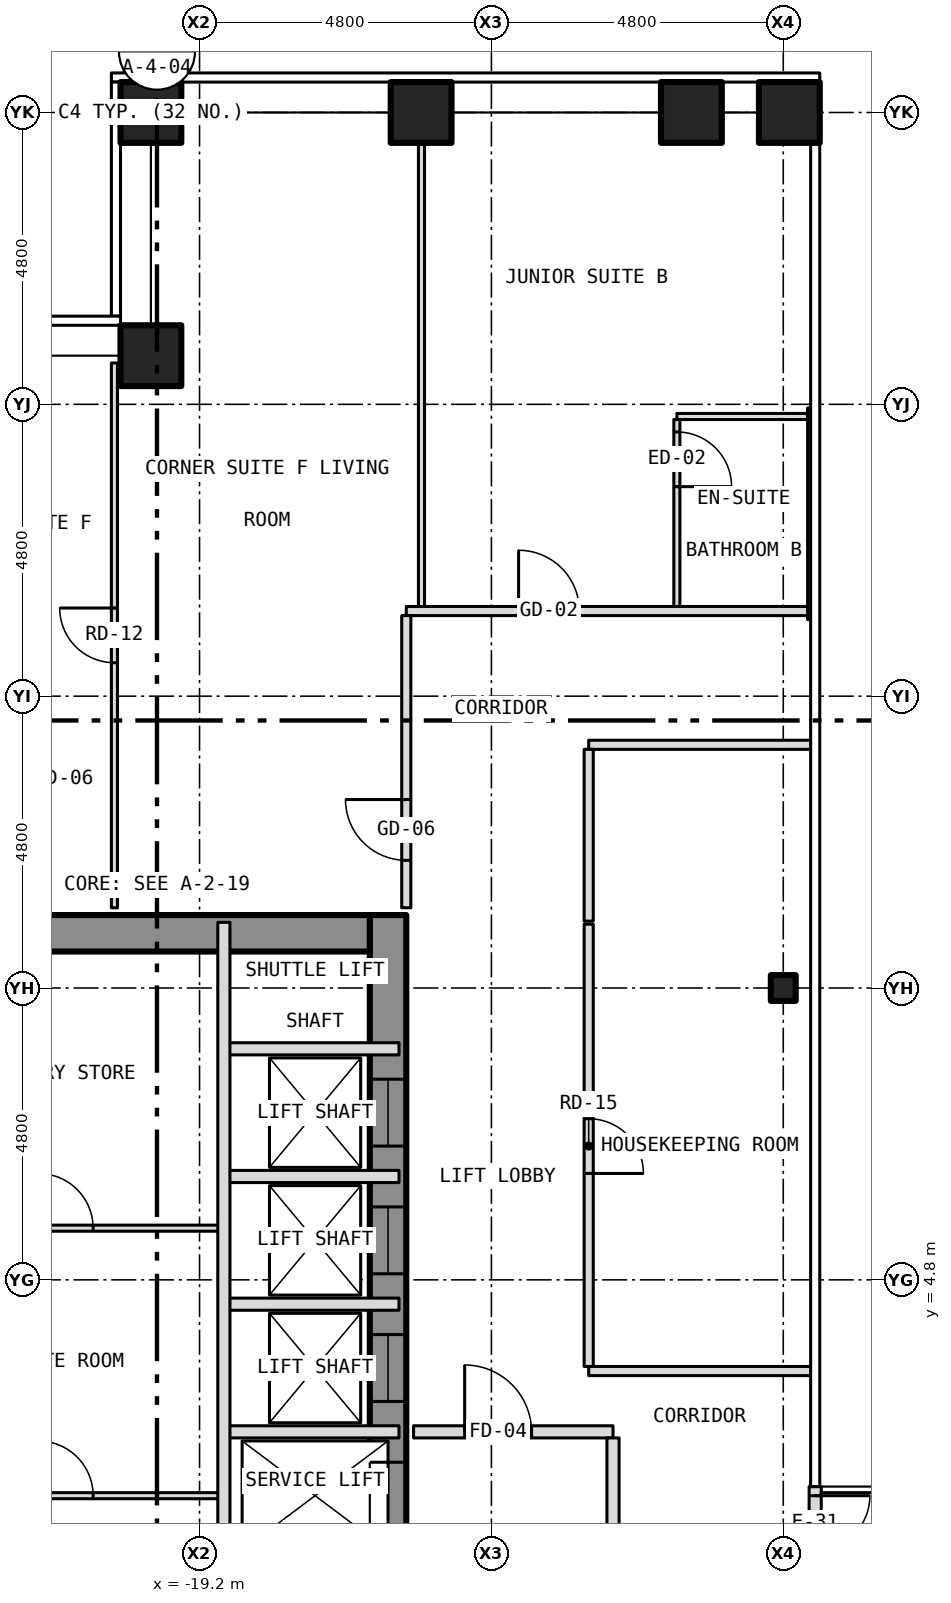
"""IFC4 building model, lengths in metres.
Left out: names, types, materials, properties, quantities, classifications, styles, units other than length and angle.
Written with IfcOpenShell. Run it as: python <this file> out.ifc"""

import sys

from ifc_helpers import new_model, si_unit, direction, frame, frame_2d, origin, origin_2d, place, context, subcontext, project, spatial, rectangle, hollow_rectangle, i_section, extrude, element, fill, save


model = new_model("IFC4")
c1 = context("Model", 3, precision=1e-05, world=origin(), true_north=direction((0.0, 1.0)))
c2 = subcontext(c1, "Body", "Model", "MODEL_VIEW")
j1 = project(units=[si_unit("LENGTHUNIT", "METRE"), si_unit("PLANEANGLEUNIT", "RADIAN")], contexts=[c1])
p1 = place(None, origin())
s1 = spatial("IfcSite", under=j1, at=p1, CompositionType="ELEMENT")
p2 = place(p1, origin())
s2 = spatial("IfcBuilding", under=s1, at=p2, CompositionType="ELEMENT")
p3 = place(p2, frame((0.0, 0.0, 70.5)))
s3 = spatial("IfcBuildingStorey", under=s2, at=p3, CompositionType="ELEMENT", Elevation=70.5)
for number, where, z_axis, x_axis in (
    (1, (-20.0, 24.0, -0.15), (0.0, 0.0, 1.0), (1.0, 0.0, 0.0)),
    (2, (-15.556, 24.0, -0.15), (0.0, 0.0, 1.0), (1.0, 0.0, 0.0)),
    (3, (-11.111, 24.0, -0.15), (0.0, 0.0, 1.0), (1.0, 0.0, 0.0)),
    (4, (-20.0, 20.0, -0.15), (0.0, 0.0, 1.0), (1.0, 0.0, 0.0)),
    (5, (-9.5, 24.0, -0.15), (0.0, 0.0, 1.0), (1.0, 0.0, 0.0)),
):
    element("IfcColumn", number, at=place(p3, frame(where, z_axis=z_axis, x_axis=x_axis)), inside=s3, PredefinedType="COLUMN", context=c2, shape_type="SweptSolid", body=[
        extrude(hollow_rectangle(XDim=1.0, YDim=1.0, WallThickness=0.06, at=origin_2d()), origin(), (0.0, 0.0, 1.0), 3.5),
    ])
p4 = place(p3, frame((-9.6, 9.6, -0.15), z_axis=(0.0, 0.0, 1.0), x_axis=(1.0, 0.0, 0.0)))
e6 = element("IfcColumn", 6, at=p4, inside=s3, PredefinedType="COLUMN", context=c2, shape_type="SweptSolid", body=[
    extrude(i_section(OverallWidth=0.409, OverallDepth=0.424, WebThickness=0.033, FlangeThickness=0.052, at=origin_2d()), origin(), (0.0, 0.0, 1.0), 3.5),
])
p5 = place(p3, frame((-16.1, -10.8, 0.0), z_axis=(0.0, 0.0, 1.0), x_axis=(0.0, 1.0, 0.0)))
e7 = element("IfcWall", 7, at=p5, inside=s3, PredefinedType="SHEAR", context=c2, shape_type="SweptSolid", body=[
    extrude(rectangle(XDim=21.6, YDim=0.6, at=frame_2d((10.8, 0.0))), origin(), (0.0, 0.0, 1.0), 3.25),
])
p6 = place(p5, frame((9.4, 0.0, 0.0)))
e8 = element("IfcOpeningElement", 8, at=p6, cuts=e7, PredefinedType="OPENING", context=c2, shape_type="SweptSolid", body=[
    extrude(rectangle(XDim=1.1, YDim=2.1, at=frame_2d((0.55, 1.05))), frame((0.0, 0.312, 0.0), z_axis=(0.0, -1.0, 0.0), x_axis=(1.0, 0.0, 0.0)), (0.0, 0.0, 1.0), 0.624),
])
p7 = place(p5, frame((11.5, 0.0, 0.0)))
e9 = element("IfcOpeningElement", 9, at=p7, cuts=e7, PredefinedType="OPENING", context=c2, shape_type="SweptSolid", body=[
    extrude(rectangle(XDim=1.1, YDim=2.1, at=frame_2d((0.55, 1.05))), frame((0.0, 0.312, 0.0), z_axis=(0.0, -1.0, 0.0), x_axis=(1.0, 0.0, 0.0)), (0.0, 0.0, 1.0), 0.624),
])
p8 = place(p5, frame((13.6, 0.0, 0.0)))
e10 = element("IfcOpeningElement", 10, at=p8, cuts=e7, PredefinedType="OPENING", context=c2, shape_type="SweptSolid", body=[
    extrude(rectangle(XDim=1.1, YDim=2.1, at=frame_2d((0.55, 1.05))), frame((0.0, 0.312, 0.0), z_axis=(0.0, -1.0, 0.0), x_axis=(1.0, 0.0, 0.0)), (0.0, 0.0, 1.0), 0.624),
])
p9 = place(p5, frame((15.7, 0.0, 0.0)))
e11 = element("IfcOpeningElement", 11, at=p9, cuts=e7, PredefinedType="OPENING", context=c2, shape_type="SweptSolid", body=[
    extrude(rectangle(XDim=1.1, YDim=2.1, at=frame_2d((0.55, 1.05))), frame((0.0, 0.312, 0.0), z_axis=(0.0, -1.0, 0.0), x_axis=(1.0, 0.0, 0.0)), (0.0, 0.0, 1.0), 0.624),
])
p10 = place(p5, frame((17.8, 0.0, 0.0)))
e12 = element("IfcOpeningElement", 12, at=p10, cuts=e7, PredefinedType="OPENING", context=c2, shape_type="SweptSolid", body=[
    extrude(rectangle(XDim=1.1, YDim=2.1, at=frame_2d((0.55, 1.05))), frame((0.0, 0.312, 0.0), z_axis=(0.0, -1.0, 0.0), x_axis=(1.0, 0.0, 0.0)), (0.0, 0.0, 1.0), 0.624),
])
p11 = place(p5, frame((0.758, 0.0, 0.0)))
e13 = element("IfcOpeningElement", 13, at=p11, cuts=e7, PredefinedType="OPENING", context=c2, shape_type="SweptSolid", body=[
    extrude(rectangle(XDim=1.1, YDim=2.1, at=frame_2d((0.55, 1.05))), frame((0.0, 0.312, 0.0), z_axis=(0.0, -1.0, 0.0), x_axis=(1.0, 0.0, 0.0)), (0.0, 0.0, 1.0), 0.624),
])
p12 = place(p5, frame((7.5, 0.0, 0.0)))
e14 = element("IfcOpeningElement", 14, at=p12, cuts=e7, PredefinedType="OPENING", context=c2, shape_type="SweptSolid", body=[
    extrude(rectangle(XDim=1.1, YDim=2.1, at=frame_2d((0.55, 1.05))), frame((0.0, 0.312, 0.0), z_axis=(0.0, -1.0, 0.0), x_axis=(1.0, 0.0, 0.0)), (0.0, 0.0, 1.0), 0.624),
])
p13 = place(p3, frame((-23.4, 10.5, 0.0), z_axis=(0.0, 0.0, 1.0), x_axis=(1.0, 0.0, 0.0)))
e15 = element("IfcWall", 15, at=p13, inside=s3, PredefinedType="SHEAR", context=c2, shape_type="SweptSolid", body=[
    extrude(rectangle(XDim=7.0, YDim=0.6, at=frame_2d((3.5, 0.0))), origin(), (0.0, 0.0, 1.0), 3.25),
])
p14 = place(p3, frame((-9.075, -1.4, 0.0), z_axis=(0.0, 0.0, 1.0), x_axis=(0.0, 1.0, 0.0)))
e16 = element("IfcWall", 16, at=p14, inside=s3, PredefinedType="SOLIDWALL", context=c2, shape_type="SweptSolid", body=[
    extrude(rectangle(XDim=2.8, YDim=0.2, at=frame_2d((1.4, 0.0))), origin(), (0.0, 0.0, 1.0), 3.5),
])
p15 = place(p14, frame((0.15, 0.0, 0.0)))
e17 = element("IfcOpeningElement", 17, at=p15, cuts=e16, PredefinedType="OPENING", context=c2, shape_type="SweptSolid", body=[
    extrude(rectangle(XDim=0.9, YDim=2.1, at=frame_2d((0.45, 1.05))), frame((0.0, 0.112, 0.0), z_axis=(0.0, -1.0, 0.0), x_axis=(1.0, 0.0, 0.0)), (0.0, 0.0, 1.0), 0.224),
])
p16 = place(p14, frame((1.75, 0.0, 0.0)))
e18 = element("IfcOpeningElement", 18, at=p16, cuts=e16, PredefinedType="OPENING", context=c2, shape_type="SweptSolid", body=[
    extrude(rectangle(XDim=0.9, YDim=2.1, at=frame_2d((0.45, 1.05))), frame((0.0, 0.112, 0.0), z_axis=(0.0, -1.0, 0.0), x_axis=(1.0, 0.0, 0.0)), (0.0, 0.0, 1.0), 0.224),
])
p17 = place(p3, frame((-23.88, 1.25, 0.0), z_axis=(0.0, 0.0, 1.0), x_axis=(1.0, 0.0, 0.0)))
e19 = element("IfcWall", 19, at=p17, inside=s3, PredefinedType="PARTITIONING", context=c2, shape_type="SweptSolid", body=[
    extrude(rectangle(XDim=5.08, YDim=0.1, at=frame_2d((2.54, 0.0))), origin(), (0.0, 0.0, 1.0), 3.25),
])
p18 = place(p17, frame((2.03, 0.0, 0.0)))
e20 = element("IfcOpeningElement", 20, at=p18, cuts=e19, PredefinedType="OPENING", context=c2, shape_type="SweptSolid", body=[
    extrude(rectangle(XDim=0.9, YDim=2.1, at=frame_2d((0.45, 1.05))), frame((0.0, 0.062, 0.0), z_axis=(0.0, -1.0, 0.0), x_axis=(1.0, 0.0, 0.0)), (0.0, 0.0, 1.0), 0.124),
])
p19 = place(p3, frame((-18.8, 2.3, 0.0), z_axis=(0.0, 0.0, 1.0), x_axis=(1.0, 0.0, 0.0)))
e21 = element("IfcWall", 21, at=p19, inside=s3, PredefinedType="PARTITIONING", context=c2, shape_type="SweptSolid", body=[
    extrude(rectangle(XDim=2.88, YDim=0.2, at=frame_2d((1.44, 0.0))), origin(), (0.0, 0.0, 1.0), 3.25),
])
p20 = place(p3, frame((-15.68, 2.3, 0.0), z_axis=(0.0, 0.0, 1.0), x_axis=(1.0, 0.0, 0.0)))
e22 = element("IfcWall", 22, at=p20, inside=s3, PredefinedType="PARTITIONING", context=c2, shape_type="SweptSolid", body=[
    extrude(rectangle(XDim=3.28, YDim=0.2, at=frame_2d((1.64, 0.0))), origin(), (0.0, 0.0, 1.0), 3.35),
])
p21 = place(p20, frame((0.84, 0.0, 0.0)))
e23 = element("IfcOpeningElement", 23, at=p21, cuts=e22, PredefinedType="OPENING", context=c2, shape_type="SweptSolid", body=[
    extrude(rectangle(XDim=1.1, YDim=2.1, at=frame_2d((0.55, 1.05))), frame((0.0, 0.112, 0.0), z_axis=(0.0, -1.0, 0.0), x_axis=(1.0, 0.0, 0.0)), (0.0, 0.0, 1.0), 0.224),
])
p22 = place(p3, frame((-12.8, 3.3, 0.0), z_axis=(0.0, 0.0, 1.0), x_axis=(1.0, 0.0, 0.0)))
e24 = element("IfcWall", 24, at=p22, inside=s3, PredefinedType="PARTITIONING", context=c2, shape_type="SweptSolid", body=[
    extrude(rectangle(XDim=3.68, YDim=0.15, at=frame_2d((1.84, 0.0))), origin(), (0.0, 0.0, 1.0), 3.35),
])
p23 = place(p3, frame((-18.8, 4.4, 0.0), z_axis=(0.0, 0.0, 1.0), x_axis=(1.0, 0.0, 0.0)))
e25 = element("IfcWall", 25, at=p23, inside=s3, PredefinedType="PARTITIONING", context=c2, shape_type="SweptSolid", body=[
    extrude(rectangle(XDim=2.88, YDim=0.2, at=frame_2d((1.44, 0.0))), origin(), (0.0, 0.0, 1.0), 3.25),
])
p24 = place(p3, frame((-23.88, 5.65, 0.0), z_axis=(0.0, 0.0, 1.0), x_axis=(1.0, 0.0, 0.0)))
e26 = element("IfcWall", 26, at=p24, inside=s3, PredefinedType="PARTITIONING", context=c2, shape_type="SweptSolid", body=[
    extrude(rectangle(XDim=5.08, YDim=0.1, at=frame_2d((2.54, 0.0))), origin(), (0.0, 0.0, 1.0), 3.25),
])
p25 = place(p24, frame((2.03, 0.0, 0.0)))
e27 = element("IfcOpeningElement", 27, at=p25, cuts=e26, PredefinedType="OPENING", context=c2, shape_type="SweptSolid", body=[
    extrude(rectangle(XDim=0.9, YDim=2.1, at=frame_2d((0.45, 1.05))), frame((0.0, 0.062, 0.0), z_axis=(0.0, -1.0, 0.0), x_axis=(1.0, 0.0, 0.0)), (0.0, 0.0, 1.0), 0.124),
])
for number, where, z_axis, x_axis in (
    (28, (-18.8, 6.5, 0.0), (0.0, 0.0, 1.0), (1.0, 0.0, 0.0)),
    (29, (-18.8, 8.6, 0.0), (0.0, 0.0, 1.0), (1.0, 0.0, 0.0)),
):
    element("IfcWall", number, at=place(p3, frame(where, z_axis=z_axis, x_axis=x_axis)), inside=s3, PredefinedType="PARTITIONING", context=c2, shape_type="SweptSolid", body=[
        extrude(rectangle(XDim=2.88, YDim=0.2, at=frame_2d((1.44, 0.0))), origin(), (0.0, 0.0, 1.0), 3.25),
    ])
p26 = place(p3, frame((-12.8, 13.6, 0.0), z_axis=(0.0, 0.0, 1.0), x_axis=(1.0, 0.0, 0.0)))
e30 = element("IfcWall", 30, at=p26, inside=s3, PredefinedType="PARTITIONING", context=c2, shape_type="SweptSolid", body=[
    extrude(rectangle(XDim=3.68, YDim=0.15, at=frame_2d((1.84, 0.0))), origin(), (0.0, 0.0, 1.0), 3.35),
])
p27 = place(p3, frame((-15.8, 15.8, 0.0), z_axis=(0.0, 0.0, 1.0), x_axis=(1.0, 0.0, 0.0)))
e31 = element("IfcWall", 31, at=p27, inside=s3, PredefinedType="PARTITIONING", context=c2, shape_type="SweptSolid", body=[
    extrude(rectangle(XDim=6.65, YDim=0.15, at=frame_2d((3.325, 0.0))), origin(), (0.0, 0.0, 1.0), 3.35),
])
p28 = place(p27, frame((1.847, 0.0, 0.0)))
e32 = element("IfcOpeningElement", 32, at=p28, cuts=e31, PredefinedType="OPENING", context=c2, shape_type="SweptSolid", body=[
    extrude(rectangle(XDim=1.0, YDim=2.1, at=frame_2d((0.5, 1.05))), frame((0.0, 0.087, 0.0), z_axis=(0.0, -1.0, 0.0), x_axis=(1.0, 0.0, 0.0)), (0.0, 0.0, 1.0), 0.174),
])
p29 = place(p3, frame((-11.35, 19.0, 0.0), z_axis=(0.0, 0.0, 1.0), x_axis=(1.0, 0.0, 0.0)))
e33 = element("IfcWall", 33, at=p29, inside=s3, PredefinedType="PARTITIONING", context=c2, shape_type="SweptSolid", body=[
    extrude(rectangle(XDim=2.2, YDim=0.1, at=frame_2d((1.1, 0.0))), origin(), (0.0, 0.0, 1.0), 3.35),
])
p30 = place(p3, frame((-20.6, 10.92, 0.0), z_axis=(0.0, 0.0, 1.0), x_axis=(0.0, 1.0, 0.0)))
e34 = element("IfcWall", 34, at=p30, inside=s3, PredefinedType="PARTITIONING", context=c2, shape_type="SweptSolid", body=[
    extrude(rectangle(XDim=8.96, YDim=0.1, at=frame_2d((4.48, 0.0))), origin(), (0.0, 0.0, 1.0), 3.35),
])
p31 = place(p30, frame((4.03, 0.0, 0.0)))
e35 = element("IfcOpeningElement", 35, at=p31, cuts=e34, PredefinedType="OPENING", context=c2, shape_type="SweptSolid", body=[
    extrude(rectangle(XDim=0.9, YDim=2.1, at=frame_2d((0.45, 1.05))), frame((0.0, 0.062, 0.0), z_axis=(0.0, -1.0, 0.0), x_axis=(1.0, 0.0, 0.0)), (0.0, 0.0, 1.0), 0.124),
])
p32 = place(p3, frame((-18.8, -1.8, 0.0), z_axis=(0.0, 0.0, 1.0), x_axis=(0.0, 1.0, 0.0)))
e36 = element("IfcWall", 36, at=p32, inside=s3, PredefinedType="PARTITIONING", context=c2, shape_type="SweptSolid", body=[
    extrude(rectangle(XDim=12.48, YDim=0.2, at=frame_2d((6.24, 0.0))), origin(), (0.0, 0.0, 1.0), 3.25),
])
p33 = place(p3, frame((-15.8, 10.92, 0.0), z_axis=(0.0, 0.0, 1.0), x_axis=(0.0, 1.0, 0.0)))
e37 = element("IfcWall", 37, at=p33, inside=s3, PredefinedType="PARTITIONING", context=c2, shape_type="SweptSolid", body=[
    extrude(rectangle(XDim=4.805, YDim=0.15, at=frame_2d((2.403, 0.0))), origin(), (0.0, 0.0, 1.0), 3.35),
])
p34 = place(p33, frame((0.78, 0.0, 0.0)))
e38 = element("IfcOpeningElement", 38, at=p34, cuts=e37, PredefinedType="OPENING", context=c2, shape_type="SweptSolid", body=[
    extrude(rectangle(XDim=1.0, YDim=2.1, at=frame_2d((0.5, 1.05))), frame((0.0, 0.087, 0.0), z_axis=(0.0, -1.0, 0.0), x_axis=(1.0, 0.0, 0.0)), (0.0, 0.0, 1.0), 0.174),
])
p35 = place(p3, frame((-15.55, 15.875, 0.0), z_axis=(0.0, 0.0, 1.0), x_axis=(0.0, 1.0, 0.0)))
e39 = element("IfcWall", 39, at=p35, inside=s3, PredefinedType="PARTITIONING", context=c2, shape_type="SweptSolid", body=[
    extrude(rectangle(XDim=8.005, YDim=0.1, at=frame_2d((4.002, 0.0))), origin(), (0.0, 0.0, 1.0), 3.35),
])
p36 = place(p3, frame((-12.8, 3.375, 0.0), z_axis=(0.0, 0.0, 1.0), x_axis=(0.0, 1.0, 0.0)))
e40 = element("IfcWall", 40, at=p36, inside=s3, PredefinedType="PARTITIONING", context=c2, shape_type="SweptSolid", body=[
    extrude(rectangle(XDim=7.275, YDim=0.15, at=frame_2d((3.637, 0.0))), origin(), (0.0, 0.0, 1.0), 3.35),
])
p37 = place(p36, frame((3.175, 0.0, 0.0)))
e41 = element("IfcOpeningElement", 41, at=p37, cuts=e40, PredefinedType="OPENING", context=c2, shape_type="SweptSolid", body=[
    extrude(rectangle(XDim=0.9, YDim=2.1, at=frame_2d((0.45, 1.05))), frame((0.0, 0.087, 0.0), z_axis=(0.0, -1.0, 0.0), x_axis=(1.0, 0.0, 0.0)), (0.0, 0.0, 1.0), 0.174),
])
p38 = place(p3, frame((-12.8, 10.7, 0.0), z_axis=(0.0, 0.0, 1.0), x_axis=(0.0, 1.0, 0.0)))
e42 = element("IfcWall", 42, at=p38, inside=s3, PredefinedType="PARTITIONING", context=c2, shape_type="SweptSolid", body=[
    extrude(rectangle(XDim=2.825, YDim=0.15, at=frame_2d((1.413, 0.0))), origin(), (0.0, 0.0, 1.0), 3.35),
])
p39 = place(p3, frame((-12.4, -1.8, 0.0), z_axis=(0.0, 0.0, 1.0), x_axis=(0.0, 1.0, 0.0)))
e43 = element("IfcWall", 43, at=p39, inside=s3, PredefinedType="PARTITIONING", context=c2, shape_type="SweptSolid", body=[
    extrude(rectangle(XDim=4.0, YDim=0.2, at=frame_2d((2.0, 0.0))), origin(), (0.0, 0.0, 1.0), 3.35),
])
p40 = place(p39, frame((1.25, 0.0, 0.0)))
e44 = element("IfcOpeningElement", 44, at=p40, cuts=e43, PredefinedType="OPENING", context=c2, shape_type="SweptSolid", body=[
    extrude(rectangle(XDim=1.1, YDim=2.1, at=frame_2d((0.55, 1.05))), frame((0.0, 0.112, 0.0), z_axis=(0.0, -1.0, 0.0), x_axis=(1.0, 0.0, 0.0)), (0.0, 0.0, 1.0), 0.224),
])
p41 = place(p3, frame((-11.35, 15.875, 0.0), z_axis=(0.0, 0.0, 1.0), x_axis=(0.0, 1.0, 0.0)))
e45 = element("IfcWall", 45, at=p41, inside=s3, PredefinedType="PARTITIONING", context=c2, shape_type="SweptSolid", body=[
    extrude(rectangle(XDim=3.075, YDim=0.1, at=frame_2d((1.538, 0.0))), origin(), (0.0, 0.0, 1.0), 3.35),
])
p42 = place(p41, frame((1.971, 0.0, 0.0)))
e46 = element("IfcOpeningElement", 46, at=p42, cuts=e45, PredefinedType="OPENING", context=c2, shape_type="SweptSolid", body=[
    extrude(rectangle(XDim=0.9, YDim=2.1, at=frame_2d((0.45, 1.05))), frame((0.0, 0.062, 0.0), z_axis=(0.0, -1.0, 0.0), x_axis=(1.0, 0.0, 0.0)), (0.0, 0.0, 1.0), 0.124),
])
p43 = place(p3, frame((-9.15, 15.66, 0.0), z_axis=(0.0, 0.0, 1.0), x_axis=(0.0, 1.0, 0.0)))
e47 = element("IfcWall", 47, at=p43, inside=s3, PredefinedType="PARTITIONING", context=c2, shape_type="SweptSolid", body=[
    extrude(rectangle(XDim=3.48, YDim=0.1, at=frame_2d((1.74, 0.0))), origin(), (0.0, 0.0, 1.0), 2.733),
])
p44 = place(p16, origin())
e48 = element("IfcDoor", 48, at=p44, inside=s3, OperationType="SINGLE_SWING_RIGHT", PredefinedType="DOOR", context=c2, shape_type="SweptSolid", body=[
    extrude(rectangle(XDim=0.9, YDim=2.1, at=frame_2d((0.45, 1.05))), frame((0.0, 0.025, 0.0), z_axis=(0.0, -1.0, 0.0), x_axis=(1.0, 0.0, 0.0)), (0.0, 0.0, 1.0), 0.05),
])
fill(e18, e48)
p45 = place(p7, origin())
e49 = element("IfcDoor", 49, at=p45, inside=s3, OperationType="SLIDING_TO_LEFT", PredefinedType="DOOR", context=c2, shape_type="SweptSolid", body=[
    extrude(rectangle(XDim=1.1, YDim=2.1, at=frame_2d((0.55, 1.05))), frame((0.0, 0.025, 0.0), z_axis=(0.0, -1.0, 0.0), x_axis=(1.0, 0.0, 0.0)), (0.0, 0.0, 1.0), 0.05),
])
fill(e9, e49)
p46 = place(p8, origin())
e50 = element("IfcDoor", 50, at=p46, inside=s3, OperationType="SLIDING_TO_LEFT", PredefinedType="DOOR", context=c2, shape_type="SweptSolid", body=[
    extrude(rectangle(XDim=1.1, YDim=2.1, at=frame_2d((0.55, 1.05))), frame((0.0, 0.025, 0.0), z_axis=(0.0, -1.0, 0.0), x_axis=(1.0, 0.0, 0.0)), (0.0, 0.0, 1.0), 0.05),
])
fill(e10, e50)
p47 = place(p9, origin())
e51 = element("IfcDoor", 51, at=p47, inside=s3, OperationType="SLIDING_TO_LEFT", PredefinedType="DOOR", context=c2, shape_type="SweptSolid", body=[
    extrude(rectangle(XDim=1.1, YDim=2.1, at=frame_2d((0.55, 1.05))), frame((0.0, 0.025, 0.0), z_axis=(0.0, -1.0, 0.0), x_axis=(1.0, 0.0, 0.0)), (0.0, 0.0, 1.0), 0.05),
])
fill(e11, e51)
p48 = place(p10, origin())
e52 = element("IfcDoor", 52, at=p48, inside=s3, OperationType="SLIDING_TO_LEFT", PredefinedType="DOOR", context=c2, shape_type="SweptSolid", body=[
    extrude(rectangle(XDim=1.1, YDim=2.1, at=frame_2d((0.55, 1.05))), frame((0.0, 0.025, 0.0), z_axis=(0.0, -1.0, 0.0), x_axis=(1.0, 0.0, 0.0)), (0.0, 0.0, 1.0), 0.05),
])
fill(e12, e52)
p49 = place(p18, origin())
e53 = element("IfcDoor", 53, at=p49, inside=s3, OperationType="SINGLE_SWING_LEFT", PredefinedType="DOOR", context=c2, shape_type="SweptSolid", body=[
    extrude(rectangle(XDim=0.9, YDim=2.1, at=frame_2d((0.45, 1.05))), frame((0.0, 0.025, 0.0), z_axis=(0.0, -1.0, 0.0), x_axis=(1.0, 0.0, 0.0)), (0.0, 0.0, 1.0), 0.05),
])
fill(e20, e53)
p50 = place(p25, origin())
e54 = element("IfcDoor", 54, at=p50, inside=s3, OperationType="SINGLE_SWING_LEFT", PredefinedType="DOOR", context=c2, shape_type="SweptSolid", body=[
    extrude(rectangle(XDim=0.9, YDim=2.1, at=frame_2d((0.45, 1.05))), frame((0.0, 0.025, 0.0), z_axis=(0.0, -1.0, 0.0), x_axis=(1.0, 0.0, 0.0)), (0.0, 0.0, 1.0), 0.05),
])
fill(e27, e54)
p51 = place(p21, origin())
e55 = element("IfcDoor", 55, at=p51, inside=s3, OperationType="SINGLE_SWING_LEFT", PredefinedType="DOOR", context=c2, shape_type="SweptSolid", body=[
    extrude(rectangle(XDim=1.1, YDim=2.1, at=frame_2d((0.55, 1.05))), frame((0.0, 0.025, 0.0), z_axis=(0.0, -1.0, 0.0), x_axis=(1.0, 0.0, 0.0)), (0.0, 0.0, 1.0), 0.05),
])
fill(e23, e55)
p52 = place(p28, origin())
e56 = element("IfcDoor", 56, at=p52, inside=s3, OperationType="SINGLE_SWING_LEFT", PredefinedType="DOOR", context=c2, shape_type="SweptSolid", body=[
    extrude(rectangle(XDim=1.0, YDim=2.1, at=frame_2d((0.5, 1.05))), frame((0.0, 0.025, 0.0), z_axis=(0.0, -1.0, 0.0), x_axis=(1.0, 0.0, 0.0)), (0.0, 0.0, 1.0), 0.05),
])
fill(e32, e56)
p53 = place(p42, origin())
e57 = element("IfcDoor", 57, at=p53, inside=s3, OperationType="SINGLE_SWING_LEFT", PredefinedType="DOOR", context=c2, shape_type="SweptSolid", body=[
    extrude(rectangle(XDim=0.9, YDim=2.1, at=frame_2d((0.45, 1.05))), frame((0.0, 0.025, 0.0), z_axis=(0.0, -1.0, 0.0), x_axis=(1.0, 0.0, 0.0)), (0.0, 0.0, 1.0), 0.05),
])
fill(e46, e57)
p54 = place(p34, origin())
e58 = element("IfcDoor", 58, at=p54, inside=s3, OperationType="SINGLE_SWING_RIGHT", PredefinedType="DOOR", context=c2, shape_type="SweptSolid", body=[
    extrude(rectangle(XDim=1.0, YDim=2.1, at=frame_2d((0.5, 1.05))), frame((0.0, 0.025, 0.0), z_axis=(0.0, -1.0, 0.0), x_axis=(1.0, 0.0, 0.0)), (0.0, 0.0, 1.0), 0.05),
])
fill(e38, e58)
p55 = place(p31, origin())
e59 = element("IfcDoor", 59, at=p55, inside=s3, OperationType="SINGLE_SWING_RIGHT", PredefinedType="DOOR", context=c2, shape_type="SweptSolid", body=[
    extrude(rectangle(XDim=0.9, YDim=2.1, at=frame_2d((0.45, 1.05))), frame((0.0, 0.025, 0.0), z_axis=(0.0, -1.0, 0.0), x_axis=(1.0, 0.0, 0.0)), (0.0, 0.0, 1.0), 0.05),
])
fill(e35, e59)
p56 = place(p37, origin())
e60 = element("IfcDoor", 60, at=p56, inside=s3, OperationType="SINGLE_SWING_LEFT", PredefinedType="DOOR", context=c2, shape_type="SweptSolid", body=[
    extrude(rectangle(XDim=0.9, YDim=2.1, at=frame_2d((0.45, 1.05))), frame((0.0, 0.025, 0.0), z_axis=(0.0, -1.0, 0.0), x_axis=(1.0, 0.0, 0.0)), (0.0, 0.0, 1.0), 0.05),
])
fill(e41, e60)
save(model, sys.argv[1])
